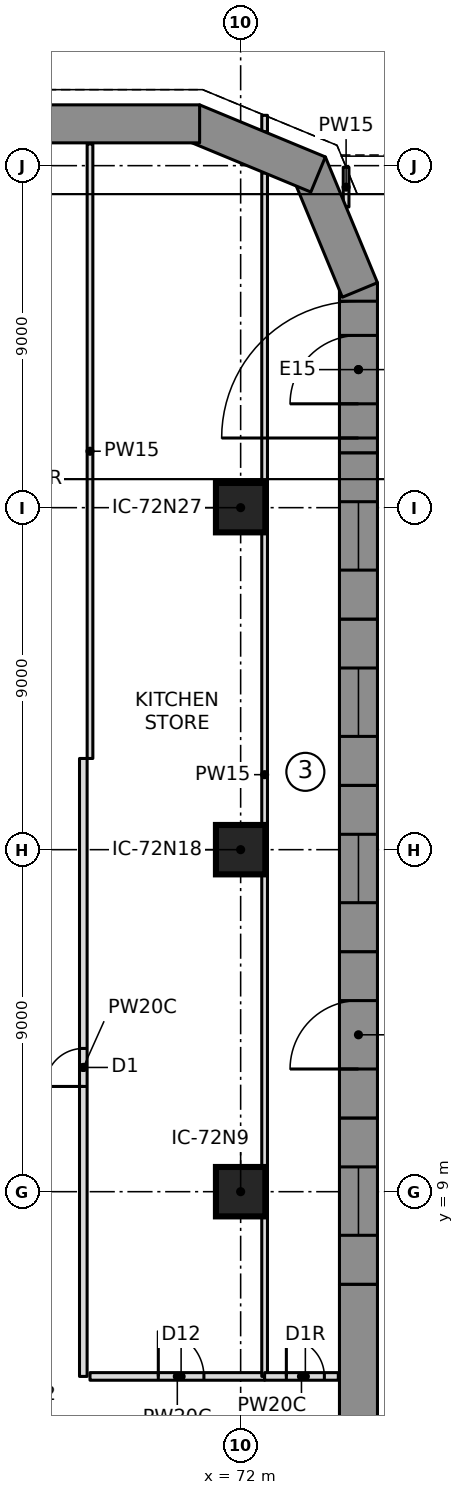
"""IFC4 building model, lengths in metres.
Left out: names, types, materials, properties, quantities, classifications, styles, units other than length and angle.
Written with IfcOpenShell. Run it as: python <this file> out.ifc"""

import sys

from ifc_helpers import new_model, si_unit, direction, frame, frame_2d, origin, origin_2d, place, context, subcontext, project, spatial, polyline, rectangle, outline, extrude, element, fill, save


model = new_model("IFC4")
c1 = context("Model", 3, precision=1e-05, world=origin(), true_north=direction((0.0, 1.0)))
c2 = subcontext(c1, "Body", "Model", "MODEL_VIEW")
j1 = project(units=[si_unit("LENGTHUNIT", "METRE"), si_unit("PLANEANGLEUNIT", "RADIAN")], contexts=[c1])
p1 = place(None, origin())
s1 = spatial("IfcSite", under=j1, at=p1, CompositionType="ELEMENT")
p2 = place(p1, origin())
s2 = spatial("IfcBuilding", under=s1, at=p2, CompositionType="ELEMENT")
p3 = place(p2, origin())
s3 = spatial("IfcBuildingStorey", under=s2, at=p3, CompositionType="ELEMENT", Elevation=0.0)
for number, where, z_axis, x_axis in (
    (1, (72.0, 9.0, 0.0), (0.0, 0.0, 1.0), (1.0, 0.0, 0.0)),
    (2, (72.0, 18.0, 0.0), (0.0, 0.0, 1.0), (1.0, 0.0, 0.0)),
    (3, (72.0, 27.0, 0.0), (0.0, 0.0, 1.0), (1.0, 0.0, 0.0)),
):
    element("IfcColumn", number, at=place(p3, frame(where, z_axis=z_axis, x_axis=x_axis)), inside=s3, PredefinedType="COLUMN", context=c2, shape_type="SweptSolid", body=[
        extrude(rectangle(XDim=1.3, YDim=1.3, at=origin_2d()), origin(), (0.0, 0.0, 1.0), 8.0),
    ])
p4 = place(p3, frame((75.1, 2.188, 0.0), z_axis=(0.0, 0.0, 1.0), x_axis=(0.0, 1.0, 0.0)))
e4 = element("IfcWall", 4, at=p4, inside=s3, PredefinedType="NOTDEFINED", context=c2, shape_type="SweptSolid", body=[
    extrude(outline(polyline([(0.0, -0.5), (4.376, -0.5), (4.376, 0.5), (0.0, 0.5), (0.0, -0.5)])), origin(), (0.0, 0.0, 1.0), 7.7),
])
p5 = place(p3, frame((75.1, 6.564, 0.0), z_axis=(0.0, 0.0, 1.0), x_axis=(0.0, 1.0, 0.0)))
e5 = element("IfcWall", 5, at=p5, inside=s3, PredefinedType="NOTDEFINED", context=c2, shape_type="SweptSolid", body=[
    extrude(outline(polyline([(0.0, -0.5), (4.376, -0.5), (4.376, 0.5), (0.0, 0.5), (0.0, -0.5)])), origin(), (0.0, 0.0, 1.0), 7.7),
])
p6 = place(p5, frame((1.288, 0.0, 0.9)))
e6 = element("IfcOpeningElement", 6, at=p6, cuts=e5, PredefinedType="OPENING", context=c2, shape_type="SweptSolid", body=[
    extrude(rectangle(XDim=1.8, YDim=2.4, at=frame_2d((0.9, 1.2))), frame((0.0, 0.51, 0.0), z_axis=(0.0, -1.0, 0.0), x_axis=(1.0, 0.0, 0.0)), (0.0, 0.0, 1.0), 1.02),
])
p7 = place(p3, frame((75.1, 10.94, 0.0), z_axis=(0.0, 0.0, 1.0), x_axis=(0.0, 1.0, 0.0)))
e7 = element("IfcWall", 7, at=p7, inside=s3, PredefinedType="NOTDEFINED", context=c2, shape_type="SweptSolid", body=[
    extrude(outline(polyline([(0.0, -0.5), (4.376, -0.5), (4.376, 0.5), (0.0, 0.5), (0.0, -0.5)])), origin(), (0.0, 0.0, 1.0), 7.7),
])
p8 = place(p7, frame((1.288, 0.0, 0.0)))
e8 = element("IfcOpeningElement", 8, at=p8, cuts=e7, PredefinedType="OPENING", context=c2, shape_type="SweptSolid", body=[
    extrude(rectangle(XDim=1.8, YDim=2.4, at=frame_2d((0.9, 1.2))), frame((0.0, 0.51, 0.0), z_axis=(0.0, -1.0, 0.0), x_axis=(1.0, 0.0, 0.0)), (0.0, 0.0, 1.0), 1.02),
])
p9 = place(p3, frame((75.1, 15.316, 0.0), z_axis=(0.0, 0.0, 1.0), x_axis=(0.0, 1.0, 0.0)))
e9 = element("IfcWall", 9, at=p9, inside=s3, PredefinedType="NOTDEFINED", context=c2, shape_type="SweptSolid", body=[
    extrude(outline(polyline([(0.0, -0.5), (4.376, -0.5), (4.376, 0.5), (0.0, 0.5), (0.0, -0.5)])), origin(), (0.0, 0.0, 1.0), 7.7),
])
p10 = place(p9, frame((1.288, 0.0, 0.9)))
e10 = element("IfcOpeningElement", 10, at=p10, cuts=e9, PredefinedType="OPENING", context=c2, shape_type="SweptSolid", body=[
    extrude(rectangle(XDim=1.8, YDim=2.4, at=frame_2d((0.9, 1.2))), frame((0.0, 0.51, 0.0), z_axis=(0.0, -1.0, 0.0), x_axis=(1.0, 0.0, 0.0)), (0.0, 0.0, 1.0), 1.02),
])
p11 = place(p3, frame((75.1, 19.693, 0.0), z_axis=(0.0, 0.0, 1.0), x_axis=(0.0, 1.0, 0.0)))
e11 = element("IfcWall", 11, at=p11, inside=s3, PredefinedType="NOTDEFINED", context=c2, shape_type="SweptSolid", body=[
    extrude(outline(polyline([(0.0, -0.5), (4.376, -0.5), (4.376, 0.5), (0.0, 0.5), (0.0, -0.5)])), origin(), (0.0, 0.0, 1.0), 7.7),
])
p12 = place(p11, frame((1.288, 0.0, 0.9)))
e12 = element("IfcOpeningElement", 12, at=p12, cuts=e11, PredefinedType="OPENING", context=c2, shape_type="SweptSolid", body=[
    extrude(rectangle(XDim=1.8, YDim=2.4, at=frame_2d((0.9, 1.2))), frame((0.0, 0.51, 0.0), z_axis=(0.0, -1.0, 0.0), x_axis=(1.0, 0.0, 0.0)), (0.0, 0.0, 1.0), 1.02),
])
p13 = place(p3, frame((75.1, 24.069, 0.0), z_axis=(0.0, 0.0, 1.0), x_axis=(0.0, 1.0, 0.0)))
e13 = element("IfcWall", 13, at=p13, inside=s3, PredefinedType="NOTDEFINED", context=c2, shape_type="SweptSolid", body=[
    extrude(outline(polyline([(0.0, -0.5), (4.376, -0.5), (4.376, 0.5), (0.0, 0.5), (0.0, -0.5)])), origin(), (0.0, 0.0, 1.0), 7.7),
])
p14 = place(p13, frame((1.288, 0.0, 0.9)))
e14 = element("IfcOpeningElement", 14, at=p14, cuts=e13, PredefinedType="OPENING", context=c2, shape_type="SweptSolid", body=[
    extrude(rectangle(XDim=1.8, YDim=2.4, at=frame_2d((0.9, 1.2))), frame((0.0, 0.51, 0.0), z_axis=(0.0, -1.0, 0.0), x_axis=(1.0, 0.0, 0.0)), (0.0, 0.0, 1.0), 1.02),
])
p15 = place(p3, frame((75.1, 28.445, 0.0), z_axis=(0.0, 0.0, 1.0), x_axis=(0.0, 1.0, 0.0)))
e15 = element("IfcWall", 15, at=p15, inside=s3, PredefinedType="NOTDEFINED", context=c2, shape_type="SweptSolid", body=[
    extrude(outline(polyline([(0.0, -0.5), (4.476, -0.5), (4.277, 0.5), (0.0, 0.5), (0.0, -0.5)])), origin(), (0.0, 0.0, 1.0), 7.7),
])
p16 = place(p15, frame((1.288, 0.0, 0.0)))
e16 = element("IfcOpeningElement", 16, at=p16, cuts=e15, PredefinedType="OPENING", context=c2, shape_type="SweptSolid", body=[
    extrude(rectangle(XDim=1.8, YDim=2.4, at=frame_2d((0.9, 1.2))), frame((0.0, 0.51, 0.0), z_axis=(0.0, -1.0, 0.0), x_axis=(1.0, 0.0, 0.0)), (0.0, 0.0, 1.0), 1.02),
])
p17 = place(p15, frame((0.388, 0.0, 0.0)))
e17 = element("IfcOpeningElement", 17, at=p17, cuts=e15, PredefinedType="OPENING", context=c2, shape_type="SweptSolid", body=[
    extrude(rectangle(XDim=3.6, YDim=2.6, at=frame_2d((1.8, 1.3))), frame((0.0, 0.51, 0.0), z_axis=(0.0, -1.0, 0.0), x_axis=(1.0, 0.0, 0.0)), (0.0, 0.0, 1.0), 1.02),
])
p18 = place(p3, frame((75.1, 32.821, 0.0), z_axis=(0.0, 0.0, 1.0), x_axis=(-0.382724875529, 0.923862365102, 0.0)))
e18 = element("IfcWall", 18, at=p18, inside=s3, PredefinedType="NOTDEFINED", context=c2, shape_type="SweptSolid", body=[
    extrude(outline(polyline([(-0.1, -0.5), (3.482, -0.5), (3.068, 0.5), (0.1, 0.5), (-0.1, -0.5)])), origin(), (0.0, 0.0, 1.0), 7.7),
])
p19 = place(p3, frame((73.847, 35.847, 0.0), z_axis=(0.0, 0.0, 1.0), x_axis=(-0.923862365102, 0.382724875529, 0.0)))
e19 = element("IfcWall", 19, at=p19, inside=s3, PredefinedType="NOTDEFINED", context=c2, shape_type="SweptSolid", body=[
    extrude(outline(polyline([(-0.207, -0.5), (3.375, -0.5), (3.175, 0.5), (0.207, 0.5), (-0.207, -0.5)])), origin(), (0.0, 0.0, 1.0), 7.7),
])
p20 = place(p3, frame((70.821, 37.1, 0.0), z_axis=(0.0, 0.0, 1.0), x_axis=(-1.0, 0.0, 0.0)))
e20 = element("IfcWall", 20, at=p20, inside=s3, PredefinedType="NOTDEFINED", context=c2, shape_type="SweptSolid", body=[
    extrude(outline(polyline([(-0.1, -0.5), (3.94, -0.5), (3.94, 0.5), (0.1, 0.5), (-0.1, -0.5)])), origin(), (0.0, 0.0, 1.0), 7.7),
])
p21 = place(p3, frame((68.036, 4.139, 0.0), z_axis=(0.0, 0.0, 1.0), x_axis=(1.0, 0.0, 0.0)))
e21 = element("IfcWall", 21, at=p21, inside=s3, PredefinedType="PARTITIONING", context=c2, shape_type="SweptSolid", body=[
    extrude(rectangle(XDim=4.595, YDim=0.2, at=frame_2d((2.297, 0.0))), origin(), (0.0, 0.0, 1.0), 7.65),
])
p22 = place(p21, frame((1.797, 0.0, 0.0)))
e22 = element("IfcOpeningElement", 22, at=p22, cuts=e21, PredefinedType="OPENING", context=c2, shape_type="SweptSolid", body=[
    extrude(rectangle(XDim=1.2, YDim=2.1, at=frame_2d((0.6, 1.05))), frame((0.0, 0.11, 0.0), z_axis=(0.0, -1.0, 0.0), x_axis=(1.0, 0.0, 0.0)), (0.0, 0.0, 1.0), 0.22),
])
p23 = place(p3, frame((72.631, 4.139, 0.0), z_axis=(0.0, 0.0, 1.0), x_axis=(0.0, 1.0, 0.0)))
e23 = element("IfcWall", 23, at=p23, inside=s3, PredefinedType="PARTITIONING", context=c2, shape_type="SweptSolid", body=[
    extrude(rectangle(XDim=31.67, YDim=0.15, at=frame_2d((15.835, 0.0))), origin(), (0.0, 0.0, 1.0), 7.65),
])
p24 = place(p3, frame((72.631, 36.892, 0.0), z_axis=(0.0, 0.0, 1.0), x_axis=(0.0, 1.0, 0.0)))
e24 = element("IfcWall", 24, at=p24, inside=s3, PredefinedType="PARTITIONING", context=c2, shape_type="SweptSolid", body=[
    extrude(rectangle(XDim=0.433, YDim=0.15, at=frame_2d((0.217, 0.0))), origin(), (0.0, 0.0, 1.0), 7.65),
])
p25 = place(p3, frame((72.631, 4.139, 0.0), z_axis=(0.0, 0.0, 1.0), x_axis=(1.0, 0.0, 0.0)))
e25 = element("IfcWall", 25, at=p25, inside=s3, PredefinedType="PARTITIONING", context=c2, shape_type="SweptSolid", body=[
    extrude(rectangle(XDim=1.939, YDim=0.2, at=frame_2d((0.97, 0.0))), origin(), (0.0, 0.0, 1.0), 7.65),
])
p26 = place(p25, frame((0.572, 0.0, 0.0)))
e26 = element("IfcOpeningElement", 26, at=p26, cuts=e25, PredefinedType="OPENING", context=c2, shape_type="SweptSolid", body=[
    extrude(rectangle(XDim=1.0, YDim=2.1, at=frame_2d((0.5, 1.05))), frame((0.0, 0.11, 0.0), z_axis=(0.0, -1.0, 0.0), x_axis=(1.0, 0.0, 0.0)), (0.0, 0.0, 1.0), 0.22),
])
p27 = place(p3, frame((74.775, 34.913, 0.0), z_axis=(0.0, 0.0, 1.0), x_axis=(0.0, 1.0, 0.0)))
e27 = element("IfcWall", 27, at=p27, inside=s3, PredefinedType="PARTITIONING", context=c2, shape_type="SweptSolid", body=[
    extrude(rectangle(XDim=1.045, YDim=0.15, at=frame_2d((0.523, 0.0))), origin(), (0.0, 0.0, 1.0), 7.65),
])
p28 = place(p3, frame((67.86, 4.139, 0.0), z_axis=(0.0, 0.0, 1.0), x_axis=(0.0, 1.0, 0.0)))
e28 = element("IfcWall", 28, at=p28, inside=s3, PredefinedType="PARTITIONING", context=c2, shape_type="SweptSolid", body=[
    extrude(rectangle(XDim=16.261, YDim=0.2, at=frame_2d((8.131, 0.0))), origin(), (0.0, 0.0, 1.0), 7.65),
])
p29 = place(p28, frame((7.631, 0.0, 0.0)))
e29 = element("IfcOpeningElement", 29, at=p29, cuts=e28, PredefinedType="OPENING", context=c2, shape_type="SweptSolid", body=[
    extrude(rectangle(XDim=1.0, YDim=2.1, at=frame_2d((0.5, 1.05))), frame((0.0, 0.11, 0.0), z_axis=(0.0, -1.0, 0.0), x_axis=(1.0, 0.0, 0.0)), (0.0, 0.0, 1.0), 0.22),
])
p30 = place(p3, frame((68.036, 20.4, 0.0), z_axis=(0.0, 0.0, 1.0), x_axis=(0.0, 1.0, 0.0)))
e30 = element("IfcWall", 30, at=p30, inside=s3, PredefinedType="PARTITIONING", context=c2, shape_type="SweptSolid", body=[
    extrude(rectangle(XDim=16.17, YDim=0.15, at=frame_2d((8.085, 0.0))), origin(), (0.0, 0.0, 1.0), 7.65),
])
p31 = place(p6, origin())
e31 = element("IfcWindow", 31, at=p31, inside=s3, PartitioningType="SINGLE_PANEL", PredefinedType="WINDOW", context=c2, shape_type="SweptSolid", body=[
    extrude(rectangle(XDim=1.8, YDim=2.4, at=frame_2d((0.9, 1.2))), frame((0.0, 0.5, 0.0), z_axis=(0.0, -1.0, 0.0), x_axis=(1.0, 0.0, 0.0)), (0.0, 0.0, 1.0), 0.06),
])
fill(e6, e31)
p32 = place(p8, origin())
e32 = element("IfcDoor", 32, at=p32, inside=s3, OperationType="DOUBLE_DOOR_SINGLE_SWING", PredefinedType="DOOR", context=c2, shape_type="SweptSolid", body=[
    extrude(rectangle(XDim=1.8, YDim=2.4, at=frame_2d((0.9, 1.2))), frame((0.0, 0.495, 0.0), z_axis=(0.0, -1.0, 0.0), x_axis=(1.0, 0.0, 0.0)), (0.0, 0.0, 1.0), 0.05),
])
fill(e8, e32)
p33 = place(p10, origin())
e33 = element("IfcWindow", 33, at=p33, inside=s3, PartitioningType="SINGLE_PANEL", PredefinedType="WINDOW", context=c2, shape_type="SweptSolid", body=[
    extrude(rectangle(XDim=1.8, YDim=2.4, at=frame_2d((0.9, 1.2))), frame((0.0, 0.5, 0.0), z_axis=(0.0, -1.0, 0.0), x_axis=(1.0, 0.0, 0.0)), (0.0, 0.0, 1.0), 0.06),
])
fill(e10, e33)
p34 = place(p12, origin())
e34 = element("IfcWindow", 34, at=p34, inside=s3, PartitioningType="SINGLE_PANEL", PredefinedType="WINDOW", context=c2, shape_type="SweptSolid", body=[
    extrude(rectangle(XDim=1.8, YDim=2.4, at=frame_2d((0.9, 1.2))), frame((0.0, 0.5, 0.0), z_axis=(0.0, -1.0, 0.0), x_axis=(1.0, 0.0, 0.0)), (0.0, 0.0, 1.0), 0.06),
])
fill(e12, e34)
p35 = place(p14, origin())
e35 = element("IfcWindow", 35, at=p35, inside=s3, PartitioningType="SINGLE_PANEL", PredefinedType="WINDOW", context=c2, shape_type="SweptSolid", body=[
    extrude(rectangle(XDim=1.8, YDim=2.4, at=frame_2d((0.9, 1.2))), frame((0.0, 0.5, 0.0), z_axis=(0.0, -1.0, 0.0), x_axis=(1.0, 0.0, 0.0)), (0.0, 0.0, 1.0), 0.06),
])
fill(e14, e35)
p36 = place(p16, origin())
e36 = element("IfcDoor", 36, at=p36, inside=s3, OperationType="DOUBLE_DOOR_SINGLE_SWING", PredefinedType="DOOR", context=c2, shape_type="SweptSolid", body=[
    extrude(rectangle(XDim=1.8, YDim=2.4, at=frame_2d((0.9, 1.2))), frame((0.0, 0.495, 0.0), z_axis=(0.0, -1.0, 0.0), x_axis=(1.0, 0.0, 0.0)), (0.0, 0.0, 1.0), 0.05),
])
fill(e16, e36)
p37 = place(p22, origin())
e37 = element("IfcDoor", 37, at=p37, inside=s3, OperationType="SINGLE_SWING_RIGHT", PredefinedType="DOOR", context=c2, shape_type="SweptSolid", body=[
    extrude(rectangle(XDim=1.2, YDim=2.1, at=frame_2d((0.6, 1.05))), frame((0.0, 0.025, 0.0), z_axis=(0.0, -1.0, 0.0), x_axis=(1.0, 0.0, 0.0)), (0.0, 0.0, 1.0), 0.05),
])
fill(e22, e37)
p38 = place(p26, origin())
e38 = element("IfcDoor", 38, at=p38, inside=s3, OperationType="SINGLE_SWING_RIGHT", PredefinedType="DOOR", context=c2, shape_type="SweptSolid", body=[
    extrude(rectangle(XDim=1.0, YDim=2.1, at=frame_2d((0.5, 1.05))), frame((0.0, 0.025, 0.0), z_axis=(0.0, -1.0, 0.0), x_axis=(1.0, 0.0, 0.0)), (0.0, 0.0, 1.0), 0.05),
])
fill(e26, e38)
p39 = place(p29, origin())
e39 = element("IfcDoor", 39, at=p39, inside=s3, OperationType="SINGLE_SWING_LEFT", PredefinedType="DOOR", context=c2, shape_type="SweptSolid", body=[
    extrude(rectangle(XDim=1.0, YDim=2.1, at=frame_2d((0.5, 1.05))), frame((0.0, 0.025, 0.0), z_axis=(0.0, -1.0, 0.0), x_axis=(1.0, 0.0, 0.0)), (0.0, 0.0, 1.0), 0.05),
])
fill(e29, e39)
p40 = place(p17, origin())
e40 = element("IfcDoor", 40, at=p40, inside=s3, OperationType="ROLLINGUP", PredefinedType="DOOR", context=c2, shape_type="SweptSolid", body=[
    extrude(rectangle(XDim=3.6, YDim=2.6, at=frame_2d((1.8, 1.3))), frame((0.0, 0.025, 0.0), z_axis=(0.0, -1.0, 0.0), x_axis=(1.0, 0.0, 0.0)), (0.0, 0.0, 1.0), 0.05),
])
fill(e17, e40)
save(model, sys.argv[1])
